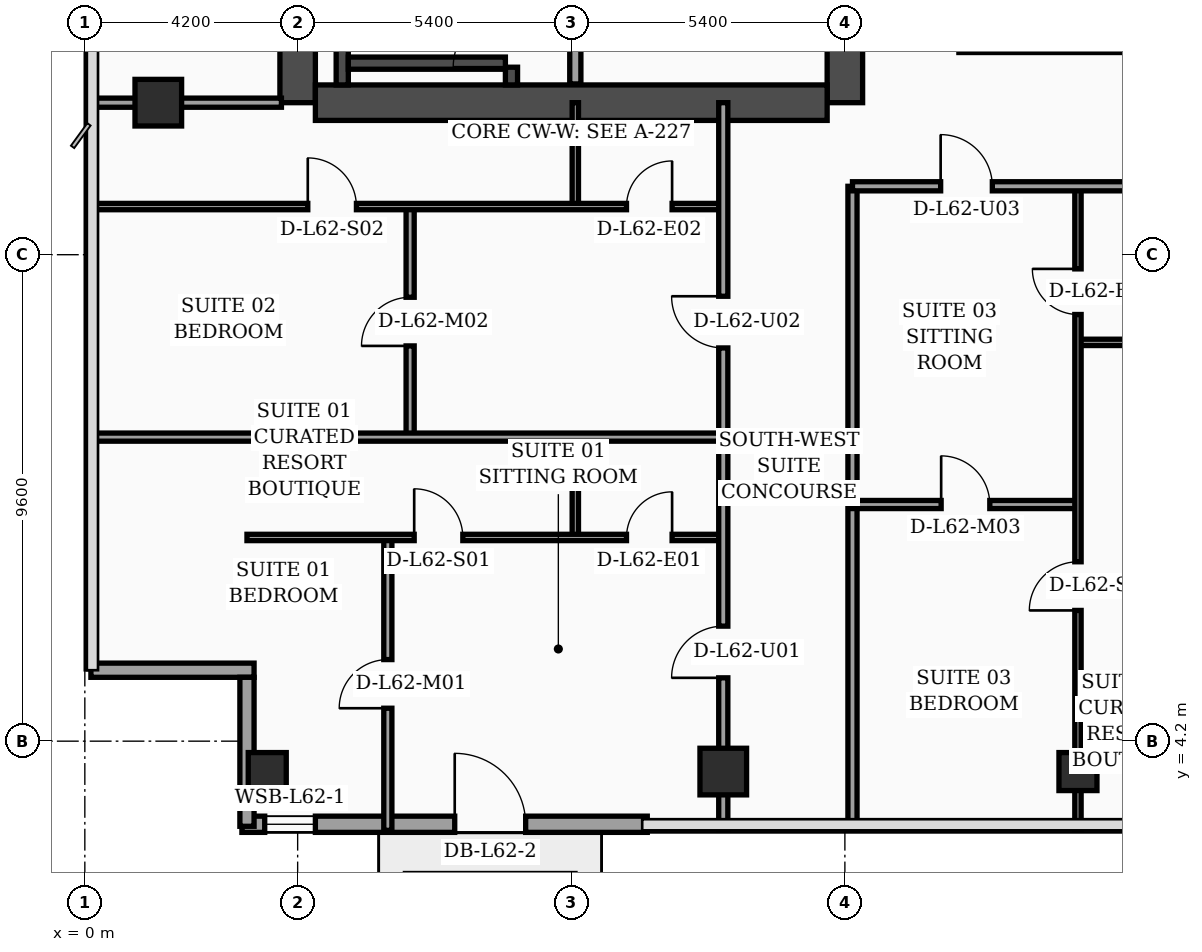
"""IFC4 building model, lengths in metres.
Left out: names, types, materials, properties, quantities, classifications, styles, units other than length and angle.
Written with IfcOpenShell. Run it as: python <this file> out.ifc"""

import sys

from ifc_helpers import new_model, si_unit, direction, frame, frame_2d, origin, origin_2d, place, context, subcontext, project, spatial, rectangle, hollow_rectangle, extrude, element, fill, save


model = new_model("IFC4")
c1 = context("Model", 3, precision=1e-05, world=origin(), true_north=direction((0.0, 1.0)))
c2 = subcontext(c1, "Body", "Model", "MODEL_VIEW")
j1 = project(units=[si_unit("LENGTHUNIT", "METRE"), si_unit("PLANEANGLEUNIT", "RADIAN")], contexts=[c1])
p1 = place(None, origin())
s1 = spatial("IfcSite", under=j1, at=p1, CompositionType="ELEMENT")
p2 = place(p1, origin())
s2 = spatial("IfcBuilding", under=s1, at=p2, CompositionType="ELEMENT")
p3 = place(p2, frame((0.0, 0.0, 251.4)))
s3 = spatial("IfcBuildingStorey", under=s2, at=p3, CompositionType="ELEMENT", Elevation=251.4)
p4 = place(p3, frame((4.2, 16.8, 0.0), z_axis=(0.0, 0.0, 1.0), x_axis=(0.0, 1.0, 0.0)))
e1 = element("IfcWall", 1, at=p4, inside=s3, PredefinedType="SHEAR", context=c2, shape_type="SweptSolid", body=[
    extrude(rectangle(XDim=21.6, YDim=0.7, at=frame_2d((10.8, 0.0))), origin(), (0.0, 0.0, 1.0), 3.56),
])
p5 = place(p3, frame((15.0, 16.8, 0.0), z_axis=(0.0, 0.0, 1.0), x_axis=(0.0, 1.0, 0.0)))
e2 = element("IfcWall", 2, at=p5, inside=s3, PredefinedType="SHEAR", context=c2, shape_type="SweptSolid", body=[
    extrude(rectangle(XDim=21.6, YDim=0.7, at=frame_2d((10.8, 0.0))), origin(), (0.0, 0.0, 1.0), 3.56),
])
p6 = place(p5, frame((8.65, 0.0, 0.0)))
e3 = element("IfcOpeningElement", 3, at=p6, cuts=e2, PredefinedType="OPENING", context=c2, shape_type="SweptSolid", body=[
    extrude(rectangle(XDim=1.1, YDim=2.2, at=frame_2d((0.55, 1.1))), frame((0.0, 0.36, 0.0), z_axis=(0.0, -1.0, 0.0), x_axis=(1.0, 0.0, 0.0)), (0.0, 0.0, 1.0), 0.72),
])
p7 = place(p5, frame((18.9, 0.0, 0.0)))
e4 = element("IfcOpeningElement", 4, at=p7, cuts=e2, PredefinedType="OPENING", context=c2, shape_type="SweptSolid", body=[
    extrude(rectangle(XDim=1.1, YDim=2.2, at=frame_2d((0.55, 1.1))), frame((0.0, 0.36, 0.0), z_axis=(0.0, -1.0, 0.0), x_axis=(1.0, 0.0, 0.0)), (0.0, 0.0, 1.0), 0.72),
])
p8 = place(p3, frame((4.55, 16.8, 0.0), z_axis=(0.0, 0.0, 1.0), x_axis=(1.0, 0.0, 0.0)))
e5 = element("IfcWall", 5, at=p8, inside=s3, PredefinedType="SHEAR", context=c2, shape_type="SweptSolid", body=[
    extrude(rectangle(XDim=10.1, YDim=0.7, at=frame_2d((5.05, 0.0))), origin(), (0.0, 0.0, 1.0), 3.56),
])
p9 = place(p3, frame((5.08, 17.15, 0.0), z_axis=(0.0, 0.0, 1.0), x_axis=(0.0, 1.0, 0.0)))
e6 = element("IfcWall", 6, at=p9, inside=s3, PredefinedType="SOLIDWALL", context=c2, shape_type="SweptSolid", body=[
    extrude(rectangle(XDim=9.64, YDim=0.24, at=frame_2d((4.82, 0.0))), origin(), (0.0, 0.0, 1.0), 3.56),
])
p10 = place(p3, frame((8.42, 17.15, 0.0), z_axis=(0.0, 0.0, 1.0), x_axis=(0.0, 1.0, 0.0)))
e7 = element("IfcWall", 7, at=p10, inside=s3, PredefinedType="SOLIDWALL", context=c2, shape_type="SweptSolid", body=[
    extrude(rectangle(XDim=9.64, YDim=0.24, at=frame_2d((4.82, 0.0))), origin(), (0.0, 0.0, 1.0), 3.56),
])
p11 = place(p10, frame((0.35, 0.0, 0.0)))
e8 = element("IfcOpeningElement", 8, at=p11, cuts=e7, PredefinedType="OPENING", context=c2, shape_type="SweptSolid", body=[
    extrude(rectangle(XDim=1.15, YDim=2.2, at=frame_2d((0.575, 1.1))), frame((0.0, 0.13, 0.0), z_axis=(0.0, -1.0, 0.0), x_axis=(1.0, 0.0, 0.0)), (0.0, 0.0, 1.0), 0.26),
])
p12 = place(p3, frame((5.2, 17.58, 0.0), z_axis=(0.0, 0.0, 1.0), x_axis=(1.0, 0.0, 0.0)))
e9 = element("IfcWall", 9, at=p12, inside=s3, PredefinedType="SOLIDWALL", context=c2, shape_type="SweptSolid", body=[
    extrude(rectangle(XDim=3.1, YDim=0.24, at=frame_2d((1.55, 0.0))), origin(), (0.0, 0.0, 1.0), 3.56),
])
p13 = place(p3, frame((3.6, 3.6, 0.0), z_axis=(0.0, 0.0, 1.0), x_axis=(1.0, 0.0, 0.0)))
e10 = element("IfcColumn", 10, at=p13, inside=s3, PredefinedType="COLUMN", context=c2, shape_type="SweptSolid", body=[
    extrude(hollow_rectangle(XDim=0.75, YDim=0.75, WallThickness=0.032, at=origin_2d()), origin(), (0.0, 0.0, 1.0), 3.56),
])
for number, where, z_axis, x_axis in (
    (11, (1.45, 16.8, 0.0), (0.0, 0.0, 1.0), (1.0, 0.0, 0.0)),
    (12, (12.6, 3.6, 0.0), (0.0, 0.0, 1.0), (1.0, 0.0, 0.0)),
):
    element("IfcColumn", number, at=place(p3, frame(where, z_axis=z_axis, x_axis=x_axis)), inside=s3, PredefinedType="COLUMN", context=c2, shape_type="SweptSolid", body=[
        extrude(rectangle(XDim=0.92, YDim=0.92, at=origin_2d()), origin(), (0.0, 0.0, 1.0), 3.56),
    ])
p14 = place(p3, frame((19.6, 3.6, 0.0), z_axis=(0.0, 0.0, 1.0), x_axis=(1.0, 0.0, 0.0)))
e13 = element("IfcColumn", 13, at=p14, inside=s3, PredefinedType="COLUMN", context=c2, shape_type="SweptSolid", body=[
    extrude(hollow_rectangle(XDim=0.75, YDim=0.75, WallThickness=0.032, at=origin_2d()), origin(), (0.0, 0.0, 1.0), 3.56),
])
p15 = place(p3, frame((3.1, 2.56, 0.0), z_axis=(0.0, 0.0, 1.0), x_axis=(1.0, 0.0, 0.0)))
e14 = element("IfcWall", 14, at=p15, inside=s3, PredefinedType="SOLIDWALL", context=c2, shape_type="SweptSolid", body=[
    extrude(rectangle(XDim=8.0, YDim=0.32, at=frame_2d((4.0, 0.0))), origin(), (0.0, 0.0, 1.0), 3.56),
])
p16 = place(p15, frame((0.45, 0.0, 0.75)))
e15 = element("IfcOpeningElement", 15, at=p16, cuts=e14, PredefinedType="OPENING", context=c2, shape_type="SweptSolid", body=[
    extrude(rectangle(XDim=1.0, YDim=1.6, at=frame_2d((0.5, 0.8))), frame((0.0, 0.17, 0.0), z_axis=(0.0, -1.0, 0.0), x_axis=(1.0, 0.0, 0.0)), (0.0, 0.0, 1.0), 0.34),
])
p17 = place(p15, frame((4.2, 0.0, 0.0)))
e16 = element("IfcOpeningElement", 16, at=p17, cuts=e14, PredefinedType="OPENING", context=c2, shape_type="SweptSolid", body=[
    extrude(rectangle(XDim=1.4, YDim=2.25, at=frame_2d((0.7, 1.125))), frame((0.0, 0.17, 0.0), z_axis=(0.0, -1.0, 0.0), x_axis=(1.0, 0.0, 0.0)), (0.0, 0.0, 1.0), 0.34),
])
p18 = place(p3, frame((0.12, 5.6, 0.0), z_axis=(0.0, 0.0, 1.0), x_axis=(1.0, 0.0, 0.0)))
e17 = element("IfcWall", 17, at=p18, inside=s3, PredefinedType="SOLIDWALL", context=c2, shape_type="SweptSolid", body=[
    extrude(rectangle(XDim=3.22, YDim=0.28, at=frame_2d((1.61, 0.0))), origin(), (0.0, 0.0, 1.0), 2.99),
])
p19 = place(p3, frame((3.2, 5.46, 0.0), z_axis=(0.0, 0.0, 1.0), x_axis=(0.0, -1.0, 0.0)))
e18 = element("IfcWall", 18, at=p19, inside=s3, PredefinedType="SOLIDWALL", context=c2, shape_type="SweptSolid", body=[
    extrude(rectangle(XDim=2.94, YDim=0.28, at=frame_2d((1.47, 0.0))), origin(), (0.0, 0.0, 1.0), 2.99),
])
p20 = place(p3, frame((9.68, 17.17, 0.0), z_axis=(0.0, 0.0, 1.0), x_axis=(0.0, 1.0, 0.0)))
e19 = element("IfcWall", 19, at=p20, inside=s3, PredefinedType="SOLIDWALL", context=c2, shape_type="SweptSolid", body=[
    extrude(rectangle(XDim=7.83, YDim=0.22, at=frame_2d((3.915, 0.0))), origin(), (0.0, 0.0, 1.0), 3.56),
])
p21 = place(p3, frame((0.08, 16.8, 0.0), z_axis=(0.0, 0.0, 1.0), x_axis=(1.0, 0.0, 0.0)))
e20 = element("IfcWall", 20, at=p21, inside=s3, PredefinedType="PARTITIONING", context=c2, shape_type="SweptSolid", body=[
    extrude(rectangle(XDim=3.8, YDim=0.18, at=frame_2d((1.9, 0.0))), origin(), (0.0, 0.0, 1.0), 2.99),
])
p22 = place(p3, frame((9.68, 8.22, 0.0), z_axis=(0.0, 0.0, 1.0), x_axis=(0.0, 1.0, 0.0)))
e21 = element("IfcWall", 21, at=p22, inside=s3, PredefinedType="PARTITIONING", context=c2, shape_type="SweptSolid", body=[
    extrude(rectangle(XDim=1.98, YDim=0.125, at=frame_2d((0.99, 0.0))), origin(), (0.0, 0.0, 1.0), 3.09),
])
p23 = place(p3, frame((5.98, 2.44, 0.0), z_axis=(0.0, 0.0, 1.0), x_axis=(0.0, 1.0, 0.0)))
e22 = element("IfcWall", 22, at=p23, inside=s3, PredefinedType="PARTITIONING", context=c2, shape_type="SweptSolid", body=[
    extrude(rectangle(XDim=5.78, YDim=0.16, at=frame_2d((2.89, 0.0))), origin(), (0.0, 0.0, 1.0), 3.09),
])
p24 = place(p23, frame((2.41, 0.0, 0.0)))
e23 = element("IfcOpeningElement", 23, at=p24, cuts=e22, PredefinedType="OPENING", context=c2, shape_type="SweptSolid", body=[
    extrude(rectangle(XDim=0.96, YDim=2.2, at=frame_2d((0.48, 1.1))), frame((0.0, 0.09, 0.0), z_axis=(0.0, -1.0, 0.0), x_axis=(1.0, 0.0, 0.0)), (0.0, 0.0, 1.0), 0.18),
])
p25 = place(p3, frame((3.2, 8.22, 0.0), z_axis=(0.0, 0.0, 1.0), x_axis=(1.0, 0.0, 0.0)))
e24 = element("IfcWall", 24, at=p25, inside=s3, PredefinedType="PARTITIONING", context=c2, shape_type="SweptSolid", body=[
    extrude(rectangle(XDim=9.4, YDim=0.125, at=frame_2d((4.7, 0.0))), origin(), (0.0, 0.0, 1.0), 2.99),
])
p26 = place(p25, frame((3.3, 0.0, 0.0)))
e25 = element("IfcOpeningElement", 25, at=p26, cuts=e24, PredefinedType="OPENING", context=c2, shape_type="SweptSolid", body=[
    extrude(rectangle(XDim=0.96, YDim=2.2, at=frame_2d((0.48, 1.1))), frame((0.0, 0.073, 0.0), z_axis=(0.0, -1.0, 0.0), x_axis=(1.0, 0.0, 0.0)), (0.0, 0.0, 1.0), 0.145),
])
p27 = place(p25, frame((7.49, 0.0, 0.0)))
e26 = element("IfcOpeningElement", 26, at=p27, cuts=e24, PredefinedType="OPENING", context=c2, shape_type="SweptSolid", body=[
    extrude(rectangle(XDim=0.9, YDim=2.15, at=frame_2d((0.45, 1.075))), frame((0.0, 0.073, 0.0), z_axis=(0.0, -1.0, 0.0), x_axis=(1.0, 0.0, 0.0)), (0.0, 0.0, 1.0), 0.145),
])
p28 = place(p3, frame((9.68, 14.75, 0.0), z_axis=(0.0, 0.0, 1.0), x_axis=(0.0, 1.0, 0.0)))
e27 = element("IfcWall", 27, at=p28, inside=s3, PredefinedType="PARTITIONING", context=c2, shape_type="SweptSolid", body=[
    extrude(rectangle(XDim=2.05, YDim=0.125, at=frame_2d((1.025, 0.0))), origin(), (0.0, 0.0, 1.0), 3.56),
])
p29 = place(p3, frame((6.42, 10.2, 0.0), z_axis=(0.0, 0.0, 1.0), x_axis=(0.0, 1.0, 0.0)))
e28 = element("IfcWall", 28, at=p29, inside=s3, PredefinedType="PARTITIONING", context=c2, shape_type="SweptSolid", body=[
    extrude(rectangle(XDim=4.55, YDim=0.16, at=frame_2d((2.275, 0.0))), origin(), (0.0, 0.0, 1.0), 3.14),
])
p30 = place(p29, frame((1.8, 0.0, 0.0)))
e29 = element("IfcOpeningElement", 29, at=p30, cuts=e28, PredefinedType="OPENING", context=c2, shape_type="SweptSolid", body=[
    extrude(rectangle(XDim=0.96, YDim=2.2, at=frame_2d((0.48, 1.1))), frame((0.0, 0.09, 0.0), z_axis=(0.0, -1.0, 0.0), x_axis=(1.0, 0.0, 0.0)), (0.0, 0.0, 1.0), 0.18),
])
p31 = place(p3, frame((0.08, 14.75, 0.0), z_axis=(0.0, 0.0, 1.0), x_axis=(1.0, 0.0, 0.0)))
e30 = element("IfcWall", 30, at=p31, inside=s3, PredefinedType="PARTITIONING", context=c2, shape_type="SweptSolid", body=[
    extrude(rectangle(XDim=12.52, YDim=0.125, at=frame_2d((6.26, 0.0))), origin(), (0.0, 0.0, 1.0), 2.99),
])
p32 = place(p31, frame((4.32, 0.0, 0.0)))
e31 = element("IfcOpeningElement", 31, at=p32, cuts=e30, PredefinedType="OPENING", context=c2, shape_type="SweptSolid", body=[
    extrude(rectangle(XDim=0.96, YDim=2.2, at=frame_2d((0.48, 1.1))), frame((0.0, 0.073, 0.0), z_axis=(0.0, -1.0, 0.0), x_axis=(1.0, 0.0, 0.0)), (0.0, 0.0, 1.0), 0.145),
])
p33 = place(p31, frame((10.61, 0.0, 0.0)))
e32 = element("IfcOpeningElement", 32, at=p33, cuts=e30, PredefinedType="OPENING", context=c2, shape_type="SweptSolid", body=[
    extrude(rectangle(XDim=0.9, YDim=2.15, at=frame_2d((0.45, 1.075))), frame((0.0, 0.073, 0.0), z_axis=(0.0, -1.0, 0.0), x_axis=(1.0, 0.0, 0.0)), (0.0, 0.0, 1.0), 0.145),
])
p34 = place(p3, frame((0.08, 10.2, 0.0), z_axis=(0.0, 0.0, 1.0), x_axis=(1.0, 0.0, 0.0)))
e33 = element("IfcWall", 33, at=p34, inside=s3, PredefinedType="PARTITIONING", context=c2, shape_type="SweptSolid", body=[
    extrude(rectangle(XDim=12.52, YDim=0.16, at=frame_2d((6.26, 0.0))), origin(), (0.0, 0.0, 1.0), 2.99),
])
p35 = place(p3, frame((12.6, 2.44, 0.0), z_axis=(0.0, 0.0, 1.0), x_axis=(0.0, 1.0, 0.0)))
e34 = element("IfcWall", 34, at=p35, inside=s3, PredefinedType="PARTITIONING", context=c2, shape_type="SweptSolid", body=[
    extrude(rectangle(XDim=14.36, YDim=0.18, at=frame_2d((7.18, 0.0))), origin(), (0.0, 0.0, 1.0), 2.99),
])
p36 = place(p35, frame((3.01, 0.0, 0.0)))
e35 = element("IfcOpeningElement", 35, at=p36, cuts=e34, PredefinedType="OPENING", context=c2, shape_type="SweptSolid", body=[
    extrude(rectangle(XDim=1.02, YDim=2.2, at=frame_2d((0.51, 1.1))), frame((0.0, 0.1, 0.0), z_axis=(0.0, -1.0, 0.0), x_axis=(1.0, 0.0, 0.0)), (0.0, 0.0, 1.0), 0.2),
])
p37 = place(p35, frame((9.52, 0.0, 0.0)))
e36 = element("IfcOpeningElement", 36, at=p37, cuts=e34, PredefinedType="OPENING", context=c2, shape_type="SweptSolid", body=[
    extrude(rectangle(XDim=1.02, YDim=2.2, at=frame_2d((0.51, 1.1))), frame((0.0, 0.1, 0.0), z_axis=(0.0, -1.0, 0.0), x_axis=(1.0, 0.0, 0.0)), (0.0, 0.0, 1.0), 0.2),
])
p38 = place(p3, frame((15.15, 2.44, 0.0), z_axis=(0.0, 0.0, 1.0), x_axis=(0.0, 1.0, 0.0)))
e37 = element("IfcWall", 37, at=p38, inside=s3, PredefinedType="PARTITIONING", context=c2, shape_type="SweptSolid", body=[
    extrude(rectangle(XDim=12.71, YDim=0.18, at=frame_2d((6.355, 0.0))), origin(), (0.0, 0.0, 1.0), 3.09),
])
p39 = place(p3, frame((19.6, 12.07, 0.0), z_axis=(0.0, 0.0, 1.0), x_axis=(1.0, 0.0, 0.0)))
e38 = element("IfcWall", 38, at=p39, inside=s3, PredefinedType="PARTITIONING", context=c2, shape_type="SweptSolid", body=[
    extrude(rectangle(XDim=2.0, YDim=0.125, at=frame_2d((1.0, 0.0))), origin(), (0.0, 0.0, 1.0), 3.56),
])
p40 = place(p3, frame((15.15, 8.87, 0.0), z_axis=(0.0, 0.0, 1.0), x_axis=(1.0, 0.0, 0.0)))
e39 = element("IfcWall", 39, at=p40, inside=s3, PredefinedType="PARTITIONING", context=c2, shape_type="SweptSolid", body=[
    extrude(rectangle(XDim=4.45, YDim=0.16, at=frame_2d((2.225, 0.0))), origin(), (0.0, 0.0, 1.0), 3.56),
])
p41 = place(p40, frame((1.75, 0.0, 0.0)))
e40 = element("IfcOpeningElement", 40, at=p41, cuts=e39, PredefinedType="OPENING", context=c2, shape_type="SweptSolid", body=[
    extrude(rectangle(XDim=0.96, YDim=2.2, at=frame_2d((0.48, 1.1))), frame((0.0, 0.09, 0.0), z_axis=(0.0, -1.0, 0.0), x_axis=(1.0, 0.0, 0.0)), (0.0, 0.0, 1.0), 0.18),
])
p42 = place(p3, frame((19.6, 2.44, 0.0), z_axis=(0.0, 0.0, 1.0), x_axis=(0.0, 1.0, 0.0)))
e41 = element("IfcWall", 41, at=p42, inside=s3, PredefinedType="PARTITIONING", context=c2, shape_type="SweptSolid", body=[
    extrude(rectangle(XDim=12.71, YDim=0.125, at=frame_2d((6.355, 0.0))), origin(), (0.0, 0.0, 1.0), 2.59),
])
p43 = place(p42, frame((4.34, 0.0, 0.0)))
e42 = element("IfcOpeningElement", 42, at=p43, cuts=e41, PredefinedType="OPENING", context=c2, shape_type="SweptSolid", body=[
    extrude(rectangle(XDim=0.96, YDim=2.2, at=frame_2d((0.48, 1.1))), frame((0.0, 0.073, 0.0), z_axis=(0.0, -1.0, 0.0), x_axis=(1.0, 0.0, 0.0)), (0.0, 0.0, 1.0), 0.145),
])
p44 = place(p42, frame((10.18, 0.0, 0.0)))
e43 = element("IfcOpeningElement", 43, at=p44, cuts=e41, PredefinedType="OPENING", context=c2, shape_type="SweptSolid", body=[
    extrude(rectangle(XDim=0.9, YDim=2.15, at=frame_2d((0.45, 1.075))), frame((0.0, 0.073, 0.0), z_axis=(0.0, -1.0, 0.0), x_axis=(1.0, 0.0, 0.0)), (0.0, 0.0, 1.0), 0.145),
])
p45 = place(p3, frame((15.15, 15.15, 0.0), z_axis=(0.0, 0.0, 1.0), x_axis=(1.0, 0.0, 0.0)))
e44 = element("IfcWall", 44, at=p45, inside=s3, PredefinedType="PARTITIONING", context=c2, shape_type="SweptSolid", body=[
    extrude(rectangle(XDim=6.45, YDim=0.18, at=frame_2d((3.225, 0.0))), origin(), (0.0, 0.0, 1.0), 2.59),
])
p46 = place(p45, frame((1.74, 0.0, 0.0)))
e45 = element("IfcOpeningElement", 45, at=p46, cuts=e44, PredefinedType="OPENING", context=c2, shape_type="SweptSolid", body=[
    extrude(rectangle(XDim=1.02, YDim=2.2, at=frame_2d((0.51, 1.1))), frame((0.0, 0.1, 0.0), z_axis=(0.0, -1.0, 0.0), x_axis=(1.0, 0.0, 0.0)), (0.0, 0.0, 1.0), 0.2),
])
p47 = place(p3, frame((17.25, 17.88, 0.0), z_axis=(0.0, 0.0, 1.0), x_axis=(1.0, 0.0, 0.0)))
e46 = element("IfcWall", 46, at=p47, inside=s3, PredefinedType="PARTITIONING", context=c2, shape_type="SweptSolid", body=[
    extrude(rectangle(XDim=4.3, YDim=0.18, at=frame_2d((2.15, 0.0))), origin(), (0.0, 0.0, 1.0), 3.56),
])
p48 = place(p16, origin())
e47 = element("IfcWindow", 47, at=p48, inside=s3, PartitioningType="SINGLE_PANEL", PredefinedType="WINDOW", context=c2, shape_type="SweptSolid", body=[
    extrude(rectangle(XDim=1.0, YDim=1.6, at=frame_2d((0.5, 0.8))), frame((0.0, 0.03, 0.0), z_axis=(0.0, -1.0, 0.0), x_axis=(1.0, 0.0, 0.0)), (0.0, 0.0, 1.0), 0.06),
])
fill(e15, e47)
p49 = place(p17, origin())
e48 = element("IfcDoor", 48, at=p49, inside=s3, OperationType="SINGLE_SWING_LEFT", PredefinedType="DOOR", context=c2, shape_type="SweptSolid", body=[
    extrude(rectangle(XDim=1.4, YDim=2.25, at=frame_2d((0.7, 1.125))), frame((0.0, 0.025, 0.0), z_axis=(0.0, -1.0, 0.0), x_axis=(1.0, 0.0, 0.0)), (0.0, 0.0, 1.0), 0.05),
])
fill(e16, e48)
p50 = place(p24, origin())
e49 = element("IfcDoor", 49, at=p50, inside=s3, OperationType="SINGLE_SWING_LEFT", PredefinedType="DOOR", context=c2, shape_type="SweptSolid", body=[
    extrude(rectangle(XDim=0.96, YDim=2.2, at=frame_2d((0.48, 1.1))), frame((0.0, 0.025, 0.0), z_axis=(0.0, -1.0, 0.0), x_axis=(1.0, 0.0, 0.0)), (0.0, 0.0, 1.0), 0.05),
])
fill(e23, e49)
p51 = place(p26, origin())
e50 = element("IfcDoor", 50, at=p51, inside=s3, OperationType="SINGLE_SWING_LEFT", PredefinedType="DOOR", context=c2, shape_type="SweptSolid", body=[
    extrude(rectangle(XDim=0.96, YDim=2.2, at=frame_2d((0.48, 1.1))), frame((0.0, 0.025, 0.0), z_axis=(0.0, -1.0, 0.0), x_axis=(1.0, 0.0, 0.0)), (0.0, 0.0, 1.0), 0.05),
])
fill(e25, e50)
p52 = place(p27, origin())
e51 = element("IfcDoor", 51, at=p52, inside=s3, OperationType="SINGLE_SWING_RIGHT", PredefinedType="DOOR", context=c2, shape_type="SweptSolid", body=[
    extrude(rectangle(XDim=0.9, YDim=2.15, at=frame_2d((0.45, 1.075))), frame((0.0, 0.025, 0.0), z_axis=(0.0, -1.0, 0.0), x_axis=(1.0, 0.0, 0.0)), (0.0, 0.0, 1.0), 0.05),
])
fill(e26, e51)
p53 = place(p30, origin())
e52 = element("IfcDoor", 52, at=p53, inside=s3, OperationType="SINGLE_SWING_LEFT", PredefinedType="DOOR", context=c2, shape_type="SweptSolid", body=[
    extrude(rectangle(XDim=0.96, YDim=2.2, at=frame_2d((0.48, 1.1))), frame((0.0, 0.025, 0.0), z_axis=(0.0, -1.0, 0.0), x_axis=(1.0, 0.0, 0.0)), (0.0, 0.0, 1.0), 0.05),
])
fill(e29, e52)
p54 = place(p32, origin())
e53 = element("IfcDoor", 53, at=p54, inside=s3, OperationType="SINGLE_SWING_LEFT", PredefinedType="DOOR", context=c2, shape_type="SweptSolid", body=[
    extrude(rectangle(XDim=0.96, YDim=2.2, at=frame_2d((0.48, 1.1))), frame((0.0, 0.025, 0.0), z_axis=(0.0, -1.0, 0.0), x_axis=(1.0, 0.0, 0.0)), (0.0, 0.0, 1.0), 0.05),
])
fill(e31, e53)
p55 = place(p33, origin())
e54 = element("IfcDoor", 54, at=p55, inside=s3, OperationType="SINGLE_SWING_RIGHT", PredefinedType="DOOR", context=c2, shape_type="SweptSolid", body=[
    extrude(rectangle(XDim=0.9, YDim=2.15, at=frame_2d((0.45, 1.075))), frame((0.0, 0.025, 0.0), z_axis=(0.0, -1.0, 0.0), x_axis=(1.0, 0.0, 0.0)), (0.0, 0.0, 1.0), 0.05),
])
fill(e32, e54)
p56 = place(p36, origin())
e55 = element("IfcDoor", 55, at=p56, inside=s3, OperationType="SINGLE_SWING_LEFT", PredefinedType="DOOR", context=c2, shape_type="SweptSolid", body=[
    extrude(rectangle(XDim=1.02, YDim=2.2, at=frame_2d((0.51, 1.1))), frame((0.0, 0.025, 0.0), z_axis=(0.0, -1.0, 0.0), x_axis=(1.0, 0.0, 0.0)), (0.0, 0.0, 1.0), 0.05),
])
fill(e35, e55)
p57 = place(p37, origin())
e56 = element("IfcDoor", 56, at=p57, inside=s3, OperationType="SINGLE_SWING_RIGHT", PredefinedType="DOOR", context=c2, shape_type="SweptSolid", body=[
    extrude(rectangle(XDim=1.02, YDim=2.2, at=frame_2d((0.51, 1.1))), frame((0.0, 0.025, 0.0), z_axis=(0.0, -1.0, 0.0), x_axis=(1.0, 0.0, 0.0)), (0.0, 0.0, 1.0), 0.05),
])
fill(e36, e56)
p58 = place(p41, origin())
e57 = element("IfcDoor", 57, at=p58, inside=s3, OperationType="SINGLE_SWING_LEFT", PredefinedType="DOOR", context=c2, shape_type="SweptSolid", body=[
    extrude(rectangle(XDim=0.96, YDim=2.2, at=frame_2d((0.48, 1.1))), frame((0.0, 0.025, 0.0), z_axis=(0.0, -1.0, 0.0), x_axis=(1.0, 0.0, 0.0)), (0.0, 0.0, 1.0), 0.05),
])
fill(e40, e57)
p59 = place(p43, origin())
e58 = element("IfcDoor", 58, at=p59, inside=s3, OperationType="SINGLE_SWING_LEFT", PredefinedType="DOOR", context=c2, shape_type="SweptSolid", body=[
    extrude(rectangle(XDim=0.96, YDim=2.2, at=frame_2d((0.48, 1.1))), frame((0.0, 0.025, 0.0), z_axis=(0.0, -1.0, 0.0), x_axis=(1.0, 0.0, 0.0)), (0.0, 0.0, 1.0), 0.05),
])
fill(e42, e58)
p60 = place(p44, origin())
e59 = element("IfcDoor", 59, at=p60, inside=s3, OperationType="SINGLE_SWING_RIGHT", PredefinedType="DOOR", context=c2, shape_type="SweptSolid", body=[
    extrude(rectangle(XDim=0.9, YDim=2.15, at=frame_2d((0.45, 1.075))), frame((0.0, 0.025, 0.0), z_axis=(0.0, -1.0, 0.0), x_axis=(1.0, 0.0, 0.0)), (0.0, 0.0, 1.0), 0.05),
])
fill(e43, e59)
p61 = place(p46, origin())
e60 = element("IfcDoor", 60, at=p61, inside=s3, OperationType="SINGLE_SWING_LEFT", PredefinedType="DOOR", context=c2, shape_type="SweptSolid", body=[
    extrude(rectangle(XDim=1.02, YDim=2.2, at=frame_2d((0.51, 1.1))), frame((0.0, 0.025, 0.0), z_axis=(0.0, -1.0, 0.0), x_axis=(1.0, 0.0, 0.0)), (0.0, 0.0, 1.0), 0.05),
])
fill(e45, e60)
p62 = place(p11, origin())
e61 = element("IfcDoor", 61, at=p62, inside=s3, OperationType="SINGLE_SWING_LEFT", PredefinedType="DOOR", context=c2, shape_type="SweptSolid", body=[
    extrude(rectangle(XDim=1.15, YDim=2.2, at=frame_2d((0.575, 1.1))), frame((0.0, 0.025, 0.0), z_axis=(0.0, -1.0, 0.0), x_axis=(1.0, 0.0, 0.0)), (0.0, 0.0, 1.0), 0.05),
])
fill(e8, e61)
save(model, sys.argv[1])
